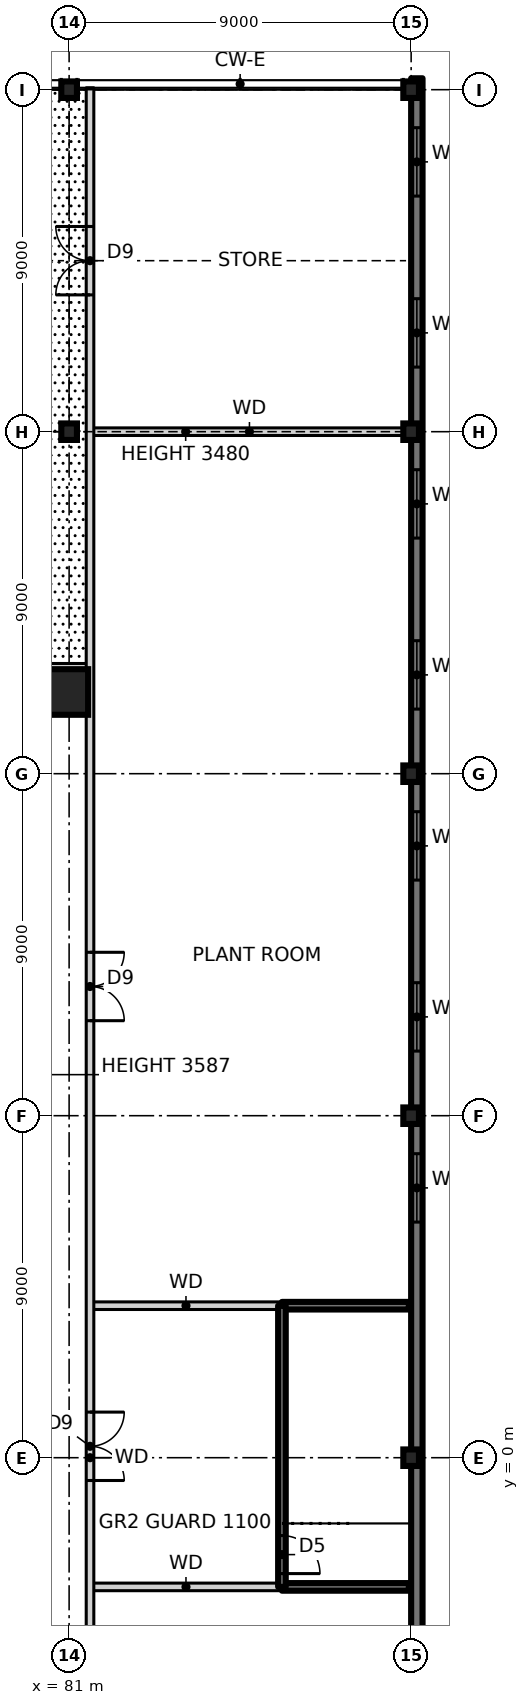
"""IFC4 building model, lengths in metres.
Left out: names, types, materials, properties, quantities, classifications, styles, units other than length and angle.
Written with IfcOpenShell. Run it as: python <this file> out.ifc"""

import sys

from ifc_helpers import new_model, si_unit, direction, frame, frame_2d, origin, origin_2d, place, context, subcontext, project, spatial, rectangle, hollow_rectangle, i_section, extrude, element, fill, save


model = new_model("IFC4")
c1 = context("Model", 3, precision=1e-05, world=origin(), true_north=direction((0.0, 1.0)))
c2 = subcontext(c1, "Body", "Model", "MODEL_VIEW")
j1 = project(units=[si_unit("LENGTHUNIT", "METRE"), si_unit("PLANEANGLEUNIT", "RADIAN")], contexts=[c1])
p1 = place(None, origin())
s1 = spatial("IfcSite", under=j1, at=p1, CompositionType="ELEMENT")
p2 = place(p1, origin())
s2 = spatial("IfcBuilding", under=s1, at=p2, CompositionType="ELEMENT")
p3 = place(p2, frame((0.0, 0.0, 10.5)))
s3 = spatial("IfcBuildingStorey", under=s2, at=p3, CompositionType="ELEMENT", Elevation=10.5)
p4 = place(p3, frame((80.9, 20.15, 0.0), z_axis=(0.0, 0.0, 1.0), x_axis=(1.0, 0.0, 0.0)))
e1 = element("IfcColumn", 1, at=p4, inside=s3, PredefinedType="COLUMN", context=c2, shape_type="SweptSolid", body=[
    extrude(hollow_rectangle(XDim=1.2, YDim=1.2, WallThickness=0.07, at=origin_2d()), origin(), (0.0, 0.0, 1.0), 4.5),
])
for number, where, z_axis, x_axis in (
    (2, (81.0, 27.0, 0.0), (0.0, 0.0, 1.0), (1.0, 0.0, 0.0)),
    (3, (81.0, 36.0, 0.0), (0.0, 0.0, 1.0), (1.0, 0.0, 0.0)),
    (4, (90.0, 0.0, 0.0), (0.0, 0.0, 1.0), (1.0, 0.0, 0.0)),
    (5, (90.0, 9.0, 0.0), (0.0, 0.0, 1.0), (1.0, 0.0, 0.0)),
    (6, (90.0, 18.0, 0.0), (0.0, 0.0, 1.0), (1.0, 0.0, 0.0)),
    (7, (90.0, 27.0, 0.0), (0.0, 0.0, 1.0), (1.0, 0.0, 0.0)),
    (8, (90.0, 36.0, 0.0), (0.0, 0.0, 1.0), (1.0, 0.0, 0.0)),
):
    element("IfcColumn", number, at=place(p3, frame(where, z_axis=z_axis, x_axis=x_axis)), inside=s3, PredefinedType="COLUMN", context=c2, shape_type="SweptSolid", body=[
        extrude(i_section(OverallWidth=0.411, OverallDepth=0.434, WebThickness=0.036, FlangeThickness=0.057, at=origin_2d()), origin(), (0.0, 0.0, 1.0), 4.5),
    ])
p5 = place(p3, frame((90.15, -36.3, -0.25), z_axis=(0.0, 0.0, 1.0), x_axis=(0.0, 1.0, 0.0)))
e9 = element("IfcWall", 9, at=p5, inside=s3, PredefinedType="SOLIDWALL", context=c2, shape_type="SweptSolid", body=[
    extrude(rectangle(XDim=72.6, YDim=0.3, at=frame_2d((36.3, 0.0))), origin(), (0.0, 0.0, 1.0), 4.75),
])
p6 = place(p5, frame((2.0, 0.0, 1.15)))
e10 = element("IfcOpeningElement", 10, at=p6, cuts=e9, PredefinedType="OPENING", context=c2, shape_type="SweptSolid", body=[
    extrude(rectangle(XDim=1.8, YDim=2.4, at=frame_2d((0.9, 1.2))), frame((0.0, 0.16, 0.0), z_axis=(0.0, -1.0, 0.0), x_axis=(1.0, 0.0, 0.0)), (0.0, 0.0, 1.0), 0.32),
])
p7 = place(p5, frame((6.5, 0.0, 1.15)))
e11 = element("IfcOpeningElement", 11, at=p7, cuts=e9, PredefinedType="OPENING", context=c2, shape_type="SweptSolid", body=[
    extrude(rectangle(XDim=1.8, YDim=2.4, at=frame_2d((0.9, 1.2))), frame((0.0, 0.16, 0.0), z_axis=(0.0, -1.0, 0.0), x_axis=(1.0, 0.0, 0.0)), (0.0, 0.0, 1.0), 0.32),
])
p8 = place(p5, frame((11.0, 0.0, 1.15)))
e12 = element("IfcOpeningElement", 12, at=p8, cuts=e9, PredefinedType="OPENING", context=c2, shape_type="SweptSolid", body=[
    extrude(rectangle(XDim=1.8, YDim=2.4, at=frame_2d((0.9, 1.2))), frame((0.0, 0.16, 0.0), z_axis=(0.0, -1.0, 0.0), x_axis=(1.0, 0.0, 0.0)), (0.0, 0.0, 1.0), 0.32),
])
p9 = place(p5, frame((15.5, 0.0, 1.15)))
e13 = element("IfcOpeningElement", 13, at=p9, cuts=e9, PredefinedType="OPENING", context=c2, shape_type="SweptSolid", body=[
    extrude(rectangle(XDim=1.8, YDim=2.4, at=frame_2d((0.9, 1.2))), frame((0.0, 0.16, 0.0), z_axis=(0.0, -1.0, 0.0), x_axis=(1.0, 0.0, 0.0)), (0.0, 0.0, 1.0), 0.32),
])
p10 = place(p5, frame((20.0, 0.0, 1.15)))
e14 = element("IfcOpeningElement", 14, at=p10, cuts=e9, PredefinedType="OPENING", context=c2, shape_type="SweptSolid", body=[
    extrude(rectangle(XDim=1.8, YDim=2.4, at=frame_2d((0.9, 1.2))), frame((0.0, 0.16, 0.0), z_axis=(0.0, -1.0, 0.0), x_axis=(1.0, 0.0, 0.0)), (0.0, 0.0, 1.0), 0.32),
])
p11 = place(p5, frame((24.5, 0.0, 1.15)))
e15 = element("IfcOpeningElement", 15, at=p11, cuts=e9, PredefinedType="OPENING", context=c2, shape_type="SweptSolid", body=[
    extrude(rectangle(XDim=1.8, YDim=2.4, at=frame_2d((0.9, 1.2))), frame((0.0, 0.16, 0.0), z_axis=(0.0, -1.0, 0.0), x_axis=(1.0, 0.0, 0.0)), (0.0, 0.0, 1.0), 0.32),
])
p12 = place(p5, frame((29.0, 0.0, 1.15)))
e16 = element("IfcOpeningElement", 16, at=p12, cuts=e9, PredefinedType="OPENING", context=c2, shape_type="SweptSolid", body=[
    extrude(rectangle(XDim=1.8, YDim=2.4, at=frame_2d((0.9, 1.2))), frame((0.0, 0.16, 0.0), z_axis=(0.0, -1.0, 0.0), x_axis=(1.0, 0.0, 0.0)), (0.0, 0.0, 1.0), 0.32),
])
p13 = place(p5, frame((42.5, 0.0, 1.15)))
e17 = element("IfcOpeningElement", 17, at=p13, cuts=e9, PredefinedType="OPENING", context=c2, shape_type="SweptSolid", body=[
    extrude(rectangle(XDim=1.8, YDim=2.4, at=frame_2d((0.9, 1.2))), frame((0.0, 0.16, 0.0), z_axis=(0.0, -1.0, 0.0), x_axis=(1.0, 0.0, 0.0)), (0.0, 0.0, 1.0), 0.32),
])
p14 = place(p5, frame((47.0, 0.0, 1.15)))
e18 = element("IfcOpeningElement", 18, at=p14, cuts=e9, PredefinedType="OPENING", context=c2, shape_type="SweptSolid", body=[
    extrude(rectangle(XDim=1.8, YDim=2.4, at=frame_2d((0.9, 1.2))), frame((0.0, 0.16, 0.0), z_axis=(0.0, -1.0, 0.0), x_axis=(1.0, 0.0, 0.0)), (0.0, 0.0, 1.0), 0.32),
])
p15 = place(p5, frame((51.5, 0.0, 1.15)))
e19 = element("IfcOpeningElement", 19, at=p15, cuts=e9, PredefinedType="OPENING", context=c2, shape_type="SweptSolid", body=[
    extrude(rectangle(XDim=1.8, YDim=2.4, at=frame_2d((0.9, 1.2))), frame((0.0, 0.16, 0.0), z_axis=(0.0, -1.0, 0.0), x_axis=(1.0, 0.0, 0.0)), (0.0, 0.0, 1.0), 0.32),
])
p16 = place(p5, frame((56.0, 0.0, 1.15)))
e20 = element("IfcOpeningElement", 20, at=p16, cuts=e9, PredefinedType="OPENING", context=c2, shape_type="SweptSolid", body=[
    extrude(rectangle(XDim=1.8, YDim=2.4, at=frame_2d((0.9, 1.2))), frame((0.0, 0.16, 0.0), z_axis=(0.0, -1.0, 0.0), x_axis=(1.0, 0.0, 0.0)), (0.0, 0.0, 1.0), 0.32),
])
p17 = place(p5, frame((60.5, 0.0, 1.15)))
e21 = element("IfcOpeningElement", 21, at=p17, cuts=e9, PredefinedType="OPENING", context=c2, shape_type="SweptSolid", body=[
    extrude(rectangle(XDim=1.8, YDim=2.4, at=frame_2d((0.9, 1.2))), frame((0.0, 0.16, 0.0), z_axis=(0.0, -1.0, 0.0), x_axis=(1.0, 0.0, 0.0)), (0.0, 0.0, 1.0), 0.32),
])
p18 = place(p5, frame((65.0, 0.0, 1.15)))
e22 = element("IfcOpeningElement", 22, at=p18, cuts=e9, PredefinedType="OPENING", context=c2, shape_type="SweptSolid", body=[
    extrude(rectangle(XDim=1.8, YDim=2.4, at=frame_2d((0.9, 1.2))), frame((0.0, 0.16, 0.0), z_axis=(0.0, -1.0, 0.0), x_axis=(1.0, 0.0, 0.0)), (0.0, 0.0, 1.0), 0.32),
])
p19 = place(p5, frame((69.5, 0.0, 1.15)))
e23 = element("IfcOpeningElement", 23, at=p19, cuts=e9, PredefinedType="OPENING", context=c2, shape_type="SweptSolid", body=[
    extrude(rectangle(XDim=1.8, YDim=2.4, at=frame_2d((0.9, 1.2))), frame((0.0, 0.16, 0.0), z_axis=(0.0, -1.0, 0.0), x_axis=(1.0, 0.0, 0.0)), (0.0, 0.0, 1.0), 0.32),
])
p20 = place(p3, frame((81.55, -3.4, 0.0), z_axis=(0.0, 0.0, 1.0), x_axis=(1.0, 0.0, 0.0)))
e24 = element("IfcWall", 24, at=p20, inside=s3, PredefinedType="SOLIDWALL", context=c2, shape_type="SweptSolid", body=[
    extrude(rectangle(XDim=5.05, YDim=0.2, at=frame_2d((2.525, 0.0))), origin(), (0.0, 0.0, 1.0), 4.25),
])
p21 = place(p3, frame((86.6, -3.4, 0.0), z_axis=(0.0, 0.0, 1.0), x_axis=(1.0, 0.0, 0.0)))
e25 = element("IfcWall", 25, at=p21, inside=s3, PredefinedType="SOLIDWALL", context=c2, shape_type="SweptSolid", body=[
    extrude(rectangle(XDim=3.34, YDim=0.2, at=frame_2d((1.67, 0.0))), origin(), (0.0, 0.0, 1.0), 4.5),
])
p22 = place(p3, frame((81.55, 4.0, 0.0), z_axis=(0.0, 0.0, 1.0), x_axis=(1.0, 0.0, 0.0)))
e26 = element("IfcWall", 26, at=p22, inside=s3, PredefinedType="SOLIDWALL", context=c2, shape_type="SweptSolid", body=[
    extrude(rectangle(XDim=5.05, YDim=0.2, at=frame_2d((2.525, 0.0))), origin(), (0.0, 0.0, 1.0), 4.25),
])
p23 = place(p3, frame((86.6, 4.0, 0.0), z_axis=(0.0, 0.0, 1.0), x_axis=(1.0, 0.0, 0.0)))
e27 = element("IfcWall", 27, at=p23, inside=s3, PredefinedType="SOLIDWALL", context=c2, shape_type="SweptSolid", body=[
    extrude(rectangle(XDim=3.34, YDim=0.2, at=frame_2d((1.67, 0.0))), origin(), (0.0, 0.0, 1.0), 4.5),
])
p24 = place(p3, frame((44.45, 20.8, 0.0), z_axis=(0.0, 0.0, 1.0), x_axis=(1.0, 0.0, 0.0)))
e28 = element("IfcWall", 28, at=p24, inside=s3, PredefinedType="SOLIDWALL", context=c2, shape_type="SweptSolid", body=[
    extrude(rectangle(XDim=37.1, YDim=0.2, at=frame_2d((18.55, 0.0))), origin(), (0.0, 0.0, 1.0), 4.25),
])
p25 = place(p24, frame((8.375, 0.0, 0.0)))
e29 = element("IfcOpeningElement", 29, at=p25, cuts=e28, PredefinedType="OPENING", context=c2, shape_type="SweptSolid", body=[
    extrude(rectangle(XDim=1.8, YDim=2.1, at=frame_2d((0.9, 1.05))), frame((0.0, 0.11, 0.0), z_axis=(0.0, -1.0, 0.0), x_axis=(1.0, 0.0, 0.0)), (0.0, 0.0, 1.0), 0.22),
])
p26 = place(p24, frame((28.625, 0.0, 0.0)))
e30 = element("IfcOpeningElement", 30, at=p26, cuts=e28, PredefinedType="OPENING", context=c2, shape_type="SweptSolid", body=[
    extrude(rectangle(XDim=1.8, YDim=2.1, at=frame_2d((0.9, 1.05))), frame((0.0, 0.11, 0.0), z_axis=(0.0, -1.0, 0.0), x_axis=(1.0, 0.0, 0.0)), (0.0, 0.0, 1.0), 0.22),
])
p27 = place(p24, frame((19.35, 0.0, 0.0)))
e31 = element("IfcOpeningElement", 31, at=p27, cuts=e28, PredefinedType="OPENING", context=c2, shape_type="SweptSolid", body=[
    extrude(rectangle(XDim=1.8, YDim=2.1, at=frame_2d((0.9, 1.05))), frame((0.0, 0.11, 0.0), z_axis=(0.0, -1.0, 0.0), x_axis=(1.0, 0.0, 0.0)), (0.0, 0.0, 1.0), 0.22),
])
p28 = place(p3, frame((81.55, 27.0, 0.0), z_axis=(0.0, 0.0, 1.0), x_axis=(1.0, 0.0, 0.0)))
e32 = element("IfcWall", 32, at=p28, inside=s3, PredefinedType="SOLIDWALL", context=c2, shape_type="SweptSolid", body=[
    extrude(rectangle(XDim=8.39, YDim=0.2, at=frame_2d((4.195, 0.0))), origin(), (0.0, 0.0, 1.0), 3.48),
])
p29 = place(p3, frame((86.6, -3.4, 0.0), z_axis=(0.0, 0.0, 1.0), x_axis=(0.0, 1.0, 0.0)))
e33 = element("IfcWall", 33, at=p29, inside=s3, PredefinedType="SOLIDWALL", context=c2, shape_type="SweptSolid", body=[
    extrude(rectangle(XDim=7.4, YDim=0.2, at=frame_2d((3.7, 0.0))), origin(), (0.0, 0.0, 1.0), 4.5),
])
p30 = place(p29, frame((0.35, 0.0, 0.0)))
e34 = element("IfcOpeningElement", 34, at=p30, cuts=e33, PredefinedType="OPENING", context=c2, shape_type="SweptSolid", body=[
    extrude(rectangle(XDim=1.0, YDim=2.1, at=frame_2d((0.5, 1.05))), frame((0.0, 0.11, 0.0), z_axis=(0.0, -1.0, 0.0), x_axis=(1.0, 0.0, 0.0)), (0.0, 0.0, 1.0), 0.22),
])
p31 = place(p3, frame((81.55, -36.05, 0.0), z_axis=(0.0, 0.0, 1.0), x_axis=(0.0, 1.0, 0.0)))
e35 = element("IfcWall", 35, at=p31, inside=s3, PredefinedType="SOLIDWALL", context=c2, shape_type="SweptSolid", body=[
    extrude(rectangle(XDim=72.1, YDim=0.2, at=frame_2d((36.05, 0.0))), origin(), (0.0, 0.0, 1.0), 4.25),
])
p32 = place(p31, frame((66.65, 0.0, 0.0)))
e36 = element("IfcOpeningElement", 36, at=p32, cuts=e35, PredefinedType="OPENING", context=c2, shape_type="SweptSolid", body=[
    extrude(rectangle(XDim=1.8, YDim=2.1, at=frame_2d((0.9, 1.05))), frame((0.0, 0.11, 0.0), z_axis=(0.0, -1.0, 0.0), x_axis=(1.0, 0.0, 0.0)), (0.0, 0.0, 1.0), 0.22),
])
p33 = place(p31, frame((23.05, 0.0, 0.0)))
e37 = element("IfcOpeningElement", 37, at=p33, cuts=e35, PredefinedType="OPENING", context=c2, shape_type="SweptSolid", body=[
    extrude(rectangle(XDim=1.8, YDim=2.1, at=frame_2d((0.9, 1.05))), frame((0.0, 0.11, 0.0), z_axis=(0.0, -1.0, 0.0), x_axis=(1.0, 0.0, 0.0)), (0.0, 0.0, 1.0), 0.22),
])
p34 = place(p31, frame((35.45, 0.0, 0.0)))
e38 = element("IfcOpeningElement", 38, at=p34, cuts=e35, PredefinedType="OPENING", context=c2, shape_type="SweptSolid", body=[
    extrude(rectangle(XDim=1.8, YDim=2.1, at=frame_2d((0.9, 1.05))), frame((0.0, 0.11, 0.0), z_axis=(0.0, -1.0, 0.0), x_axis=(1.0, 0.0, 0.0)), (0.0, 0.0, 1.0), 0.22),
])
p35 = place(p31, frame((47.55, 0.0, 0.0)))
e39 = element("IfcOpeningElement", 39, at=p35, cuts=e35, PredefinedType="OPENING", context=c2, shape_type="SweptSolid", body=[
    extrude(rectangle(XDim=1.8, YDim=2.1, at=frame_2d((0.9, 1.05))), frame((0.0, 0.11, 0.0), z_axis=(0.0, -1.0, 0.0), x_axis=(1.0, 0.0, 0.0)), (0.0, 0.0, 1.0), 0.22),
])
p36 = place(p13, origin())
e40 = element("IfcWindow", 40, at=p36, inside=s3, PartitioningType="SINGLE_PANEL", PredefinedType="WINDOW", context=c2, shape_type="SweptSolid", body=[
    extrude(rectangle(XDim=1.8, YDim=2.4, at=frame_2d((0.9, 1.2))), frame((0.0, 0.03, 0.0), z_axis=(0.0, -1.0, 0.0), x_axis=(1.0, 0.0, 0.0)), (0.0, 0.0, 1.0), 0.06),
])
fill(e17, e40)
p37 = place(p14, origin())
e41 = element("IfcWindow", 41, at=p37, inside=s3, PartitioningType="SINGLE_PANEL", PredefinedType="WINDOW", context=c2, shape_type="SweptSolid", body=[
    extrude(rectangle(XDim=1.8, YDim=2.4, at=frame_2d((0.9, 1.2))), frame((0.0, 0.03, 0.0), z_axis=(0.0, -1.0, 0.0), x_axis=(1.0, 0.0, 0.0)), (0.0, 0.0, 1.0), 0.06),
])
fill(e18, e41)
p38 = place(p15, origin())
e42 = element("IfcWindow", 42, at=p38, inside=s3, PartitioningType="SINGLE_PANEL", PredefinedType="WINDOW", context=c2, shape_type="SweptSolid", body=[
    extrude(rectangle(XDim=1.8, YDim=2.4, at=frame_2d((0.9, 1.2))), frame((0.0, 0.03, 0.0), z_axis=(0.0, -1.0, 0.0), x_axis=(1.0, 0.0, 0.0)), (0.0, 0.0, 1.0), 0.06),
])
fill(e19, e42)
p39 = place(p16, origin())
e43 = element("IfcWindow", 43, at=p39, inside=s3, PartitioningType="SINGLE_PANEL", PredefinedType="WINDOW", context=c2, shape_type="SweptSolid", body=[
    extrude(rectangle(XDim=1.8, YDim=2.4, at=frame_2d((0.9, 1.2))), frame((0.0, 0.03, 0.0), z_axis=(0.0, -1.0, 0.0), x_axis=(1.0, 0.0, 0.0)), (0.0, 0.0, 1.0), 0.06),
])
fill(e20, e43)
p40 = place(p17, origin())
e44 = element("IfcWindow", 44, at=p40, inside=s3, PartitioningType="SINGLE_PANEL", PredefinedType="WINDOW", context=c2, shape_type="SweptSolid", body=[
    extrude(rectangle(XDim=1.8, YDim=2.4, at=frame_2d((0.9, 1.2))), frame((0.0, 0.03, 0.0), z_axis=(0.0, -1.0, 0.0), x_axis=(1.0, 0.0, 0.0)), (0.0, 0.0, 1.0), 0.06),
])
fill(e21, e44)
p41 = place(p18, origin())
e45 = element("IfcWindow", 45, at=p41, inside=s3, PartitioningType="SINGLE_PANEL", PredefinedType="WINDOW", context=c2, shape_type="SweptSolid", body=[
    extrude(rectangle(XDim=1.8, YDim=2.4, at=frame_2d((0.9, 1.2))), frame((0.0, 0.03, 0.0), z_axis=(0.0, -1.0, 0.0), x_axis=(1.0, 0.0, 0.0)), (0.0, 0.0, 1.0), 0.06),
])
fill(e22, e45)
p42 = place(p19, origin())
e46 = element("IfcWindow", 46, at=p42, inside=s3, PartitioningType="SINGLE_PANEL", PredefinedType="WINDOW", context=c2, shape_type="SweptSolid", body=[
    extrude(rectangle(XDim=1.8, YDim=2.4, at=frame_2d((0.9, 1.2))), frame((0.0, 0.03, 0.0), z_axis=(0.0, -1.0, 0.0), x_axis=(1.0, 0.0, 0.0)), (0.0, 0.0, 1.0), 0.06),
])
fill(e23, e46)
p43 = place(p32, origin())
e47 = element("IfcDoor", 47, at=p43, inside=s3, OperationType="DOUBLE_DOOR_SINGLE_SWING", PredefinedType="DOOR", context=c2, shape_type="SweptSolid", body=[
    extrude(rectangle(XDim=1.8, YDim=2.1, at=frame_2d((0.9, 1.05))), frame((0.0, 0.025, 0.0), z_axis=(0.0, -1.0, 0.0), x_axis=(1.0, 0.0, 0.0)), (0.0, 0.0, 1.0), 0.05),
])
fill(e36, e47)
p44 = place(p34, frame((1.8, 0.0, 0.0), z_axis=(0.0, 0.0, 1.0), x_axis=(-1.0, 0.0, 0.0)))
e48 = element("IfcDoor", 48, at=p44, inside=s3, OperationType="DOUBLE_DOOR_SINGLE_SWING", PredefinedType="DOOR", context=c2, shape_type="SweptSolid", body=[
    extrude(rectangle(XDim=1.8, YDim=2.1, at=frame_2d((0.9, 1.05))), frame((0.0, 0.025, 0.0), z_axis=(0.0, -1.0, 0.0), x_axis=(1.0, 0.0, 0.0)), (0.0, 0.0, 1.0), 0.05),
])
fill(e38, e48)
p45 = place(p35, frame((1.8, 0.0, 0.0), z_axis=(0.0, 0.0, 1.0), x_axis=(-1.0, 0.0, 0.0)))
e49 = element("IfcDoor", 49, at=p45, inside=s3, OperationType="DOUBLE_DOOR_SINGLE_SWING", PredefinedType="DOOR", context=c2, shape_type="SweptSolid", body=[
    extrude(rectangle(XDim=1.8, YDim=2.1, at=frame_2d((0.9, 1.05))), frame((0.0, 0.025, 0.0), z_axis=(0.0, -1.0, 0.0), x_axis=(1.0, 0.0, 0.0)), (0.0, 0.0, 1.0), 0.05),
])
fill(e39, e49)
p46 = place(p30, frame((1.0, 0.0, 0.0), z_axis=(0.0, 0.0, 1.0), x_axis=(-1.0, 0.0, 0.0)))
e50 = element("IfcDoor", 50, at=p46, inside=s3, OperationType="SINGLE_SWING_RIGHT", PredefinedType="DOOR", context=c2, shape_type="SweptSolid", body=[
    extrude(rectangle(XDim=1.0, YDim=2.1, at=frame_2d((0.5, 1.05))), frame((0.0, 0.025, 0.0), z_axis=(0.0, -1.0, 0.0), x_axis=(1.0, 0.0, 0.0)), (0.0, 0.0, 1.0), 0.05),
])
fill(e34, e50)
save(model, sys.argv[1])
